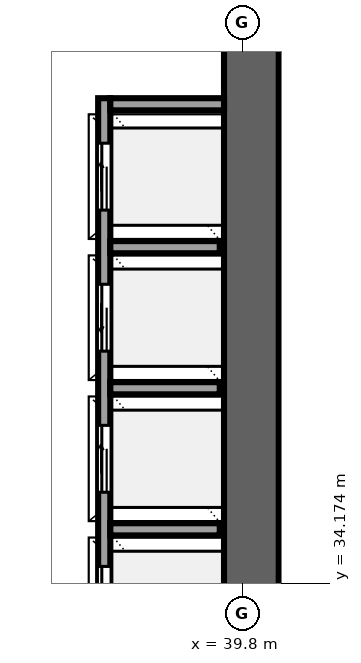
"""IFC4 building model, lengths in metres.
Left out: names, types, materials, properties, quantities, classifications, styles, units other than length and angle.
Written with IfcOpenShell. Run it as: python <this file> out.ifc"""

import sys

from ifc_helpers import new_model, si_unit, direction, frame, frame_2d, origin, place, context, subcontext, project, spatial, rectangle, extrude, source, transform, mapped, element, fill, save


model = new_model("IFC4")
c1 = context("Model", 3, precision=1e-05, world=origin(), true_north=direction((0.0, 1.0)))
c2 = subcontext(c1, "Body", "Model", "MODEL_VIEW")
j1 = project(units=[si_unit("LENGTHUNIT", "METRE"), si_unit("PLANEANGLEUNIT", "RADIAN")], contexts=[c1])
p1 = place(None, origin())
s1 = spatial("IfcSite", under=j1, at=p1, CompositionType="ELEMENT")
p2 = place(p1, origin())
s2 = spatial("IfcBuilding", under=s1, at=p2, CompositionType="ELEMENT")
p3 = place(p2, frame((0.0, 0.0, 92.35)))
s3 = spatial("IfcBuildingStorey", under=s2, at=p3, CompositionType="ELEMENT", Elevation=92.35)
p4 = place(p3, frame((39.95, 31.6, 0.0), z_axis=(0.0, 0.0, 1.0), x_axis=(0.0, 1.0, 0.0)))
e1 = element("IfcWall", 1, at=p4, inside=s3, PredefinedType="SHEAR", context=c2, shape_type="SweptSolid", body=[
    extrude(rectangle(XDim=13.6, YDim=0.9, at=frame_2d((6.8, 0.0))), origin(), (0.0, 0.0, 1.0), 3.55),
])
p5 = place(p3, frame((37.53, 32.61, 0.0), z_axis=(0.0, 0.0, 1.0), x_axis=(0.0, 1.0, 0.0)))
e2 = element("IfcWall", 2, at=p5, inside=s3, PredefinedType="SOLIDWALL", context=c2, shape_type="SweptSolid", body=[
    extrude(rectangle(XDim=9.54, YDim=0.2, at=frame_2d((4.77, 0.0))), origin(), (0.0, 0.0, 1.0), 3.25),
])
p6 = place(p5, frame((0.74, 0.0, 0.0)))
e3 = element("IfcOpeningElement", 3, at=p6, cuts=e2, PredefinedType="OPENING", context=c2, shape_type="SweptSolid", body=[
    extrude(rectangle(XDim=1.1, YDim=2.12, at=frame_2d((0.55, 1.06))), frame((0.0, 0.11, 0.0), z_axis=(0.0, -1.0, 0.0), x_axis=(1.0, 0.0, 0.0)), (0.0, 0.0, 1.0), 0.22),
])
p7 = place(p5, frame((3.06, 0.0, 0.0)))
e4 = element("IfcOpeningElement", 4, at=p7, cuts=e2, PredefinedType="OPENING", context=c2, shape_type="SweptSolid", body=[
    extrude(rectangle(XDim=1.1, YDim=2.12, at=frame_2d((0.55, 1.06))), frame((0.0, 0.11, 0.0), z_axis=(0.0, -1.0, 0.0), x_axis=(1.0, 0.0, 0.0)), (0.0, 0.0, 1.0), 0.22),
])
p8 = place(p5, frame((5.38, 0.0, 0.0)))
e5 = element("IfcOpeningElement", 5, at=p8, cuts=e2, PredefinedType="OPENING", context=c2, shape_type="SweptSolid", body=[
    extrude(rectangle(XDim=1.1, YDim=2.12, at=frame_2d((0.55, 1.06))), frame((0.0, 0.11, 0.0), z_axis=(0.0, -1.0, 0.0), x_axis=(1.0, 0.0, 0.0)), (0.0, 0.0, 1.0), 0.22),
])
p9 = place(p5, frame((7.7, 0.0, 0.0)))
e6 = element("IfcOpeningElement", 6, at=p9, cuts=e2, PredefinedType="OPENING", context=c2, shape_type="SweptSolid", body=[
    extrude(rectangle(XDim=1.1, YDim=2.12, at=frame_2d((0.55, 1.06))), frame((0.0, 0.11, 0.0), z_axis=(0.0, -1.0, 0.0), x_axis=(1.0, 0.0, 0.0)), (0.0, 0.0, 1.0), 0.22),
])
p10 = place(p3, frame((37.63, 42.05, 0.0), z_axis=(0.0, 0.0, 1.0), x_axis=(1.0, 0.0, 0.0)))
e7 = element("IfcWall", 7, at=p10, inside=s3, PredefinedType="SOLIDWALL", context=c2, shape_type="SweptSolid", body=[
    extrude(rectangle(XDim=1.87, YDim=0.2, at=frame_2d((0.935, 0.0))), origin(), (0.0, 0.0, 1.0), 3.25),
])
for number, where, z_axis, x_axis in (
    (8, (37.63, 35.06, 0.0), (0.0, 0.0, 1.0), (1.0, 0.0, 0.0)),
    (9, (37.63, 37.38, 0.0), (0.0, 0.0, 1.0), (1.0, 0.0, 0.0)),
    (10, (37.63, 39.7, 0.0), (0.0, 0.0, 1.0), (1.0, 0.0, 0.0)),
):
    element("IfcWall", number, at=place(p3, frame(where, z_axis=z_axis, x_axis=x_axis)), inside=s3, PredefinedType="SOLIDWALL", context=c2, shape_type="SweptSolid", body=[
        extrude(rectangle(XDim=1.8, YDim=0.2, at=frame_2d((0.9, 0.0))), origin(), (0.0, 0.0, 1.0), 3.25),
    ])
m1 = source(origin(), c2, "Body", "SweptSolid", [
    extrude(rectangle(XDim=1.1, YDim=2.12, at=frame_2d((0.55, 1.06))), frame((0.0, 0.025, 0.0), z_axis=(0.0, -1.0, 0.0), x_axis=(1.0, 0.0, 0.0)), (0.0, 0.0, 1.0), 0.05),
])
p11 = place(p6, origin())
e11 = element("IfcDoor", 11, at=p11, inside=s3, OperationType="SLIDING_TO_LEFT", PredefinedType="DOOR", context=c2, shape_type="MappedRepresentation", body=[
    mapped(m1, transform((0.0, 0.0, 0.0), x_axis=(1.0, 0.0, 0.0), y_axis=(0.0, 1.0, 0.0), z_axis=(0.0, 0.0, 1.0), scale=1.0)),
])
fill(e3, e11)
p12 = place(p7, origin())
e12 = element("IfcDoor", 12, at=p12, inside=s3, OperationType="SLIDING_TO_RIGHT", PredefinedType="DOOR", context=c2, shape_type="MappedRepresentation", body=[
    mapped(m1, transform((0.0, 0.0, 0.0), x_axis=(1.0, 0.0, 0.0), y_axis=(0.0, 1.0, 0.0), z_axis=(0.0, 0.0, 1.0), scale=1.0)),
])
fill(e4, e12)
p13 = place(p8, origin())
e13 = element("IfcDoor", 13, at=p13, inside=s3, OperationType="SLIDING_TO_LEFT", PredefinedType="DOOR", context=c2, shape_type="MappedRepresentation", body=[
    mapped(m1, transform((0.0, 0.0, 0.0), x_axis=(1.0, 0.0, 0.0), y_axis=(0.0, 1.0, 0.0), z_axis=(0.0, 0.0, 1.0), scale=1.0)),
])
fill(e5, e13)
p14 = place(p9, origin())
e14 = element("IfcDoor", 14, at=p14, inside=s3, OperationType="SLIDING_TO_RIGHT", PredefinedType="DOOR", context=c2, shape_type="MappedRepresentation", body=[
    mapped(m1, transform((0.0, 0.0, 0.0), x_axis=(1.0, 0.0, 0.0), y_axis=(0.0, 1.0, 0.0), z_axis=(0.0, 0.0, 1.0), scale=1.0)),
])
fill(e6, e14)
save(model, sys.argv[1])
